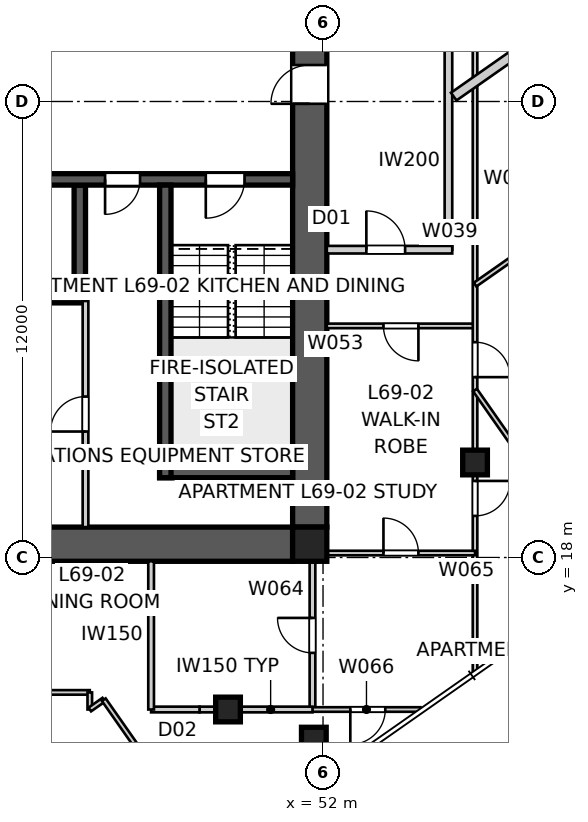
"""IFC4 building model, lengths in metres.
Left out: names, types, materials, properties, quantities, classifications, styles, units other than length and angle.
Written with IfcOpenShell. Run it as: python <this file> out.ifc"""

import sys

from ifc_helpers import new_model, si_unit, direction, frame, frame_2d, origin, origin_2d, place, context, subcontext, project, spatial, polyline, rectangle, outline, extrude, element, fill, save


model = new_model("IFC4")
c1 = context("Model", 3, precision=1e-05, world=origin(), true_north=direction((0.0, 1.0)))
c2 = subcontext(c1, "Body", "Model", "MODEL_VIEW")
j1 = project(units=[si_unit("LENGTHUNIT", "METRE"), si_unit("PLANEANGLEUNIT", "RADIAN")], contexts=[c1])
p1 = place(None, origin())
s1 = spatial("IfcSite", under=j1, at=p1, CompositionType="ELEMENT")
p2 = place(p1, origin())
s2 = spatial("IfcBuilding", under=s1, at=p2, CompositionType="ELEMENT")
p3 = place(p2, frame((0.0, 0.0, 250.6)))
s3 = spatial("IfcBuildingStorey", under=s2, at=p3, CompositionType="ELEMENT", Elevation=250.6)
p4 = place(p3, frame((51.2, 18.35, 0.0), z_axis=(0.0, 0.0, 1.0), x_axis=(-1.0, 0.0, 0.0)))
e1 = element("IfcWall", 1, at=p4, inside=s3, PredefinedType="SHEAR", context=c2, shape_type="SweptSolid", body=[
    extrude(outline(polyline([(0.0, -0.45), (22.4, -0.45), (22.4, -0.025), (22.85, -0.025), (22.85, 0.025), (22.4, 0.025), (22.4, 0.45), (0.0, 0.45), (0.0, 0.025), (-0.45, 0.025), (-0.45, -0.025), (0.0, -0.025), (0.0, -0.45)])), origin(), (0.0, 0.0, 1.0), 3.4),
])
p5 = place(p3, frame((51.65, 18.8, 0.0), z_axis=(0.0, 0.0, 1.0), x_axis=(0.0, 1.0, 0.0)))
e2 = element("IfcWall", 2, at=p5, inside=s3, PredefinedType="SHEAR", context=c2, shape_type="SweptSolid", body=[
    extrude(outline(polyline([(0.0, -0.45), (22.4, -0.45), (22.4, -0.025), (22.85, -0.025), (22.85, 0.025), (22.4, 0.025), (22.4, 0.45), (0.0, 0.45), (0.0, 0.025), (-0.45, 0.025), (-0.45, -0.025), (0.0, -0.025), (0.0, -0.45)])), origin(), (0.0, 0.0, 1.0), 3.4),
])
p6 = place(p5, frame((11.14, 0.0, 0.0)))
e3 = element("IfcOpeningElement", 3, at=p6, cuts=e2, PredefinedType="OPENING", context=c2, shape_type="SweptSolid", body=[
    extrude(rectangle(XDim=1.02, YDim=2.4, at=frame_2d((0.51, 1.2))), frame((0.0, 0.46, 0.0), z_axis=(0.0, -1.0, 0.0), x_axis=(1.0, 0.0, 0.0)), (0.0, 0.0, 1.0), 0.92),
])
p7 = place(p3, frame((51.2, 27.95, 0.0), z_axis=(0.0, 0.0, 1.0), x_axis=(-1.0, 0.0, 0.0)))
e4 = element("IfcWall", 4, at=p7, inside=s3, PredefinedType="SHEAR", context=c2, shape_type="SweptSolid", body=[
    extrude(rectangle(XDim=22.4, YDim=0.3, at=frame_2d((11.2, 0.0))), origin(), (0.0, 0.0, 1.0), 3.4),
])
p8 = place(p7, frame((19.04, 0.0, 0.0)))
e5 = element("IfcOpeningElement", 5, at=p8, cuts=e4, PredefinedType="OPENING", context=c2, shape_type="SweptSolid", body=[
    extrude(rectangle(XDim=0.92, YDim=2.1, at=frame_2d((0.46, 1.05))), frame((0.0, 0.16, 0.0), z_axis=(0.0, -1.0, 0.0), x_axis=(1.0, 0.0, 0.0)), (0.0, 0.0, 1.0), 0.32),
])
p9 = place(p7, frame((1.265, 0.0, 0.0)))
e6 = element("IfcOpeningElement", 6, at=p9, cuts=e4, PredefinedType="OPENING", context=c2, shape_type="SweptSolid", body=[
    extrude(rectangle(XDim=1.02, YDim=2.1, at=frame_2d((0.51, 1.05))), frame((0.0, 0.16, 0.0), z_axis=(0.0, -1.0, 0.0), x_axis=(1.0, 0.0, 0.0)), (0.0, 0.0, 1.0), 0.32),
])
p10 = place(p7, frame((4.015, 0.0, 0.0)))
e7 = element("IfcOpeningElement", 7, at=p10, cuts=e4, PredefinedType="OPENING", context=c2, shape_type="SweptSolid", body=[
    extrude(rectangle(XDim=0.92, YDim=2.1, at=frame_2d((0.46, 1.05))), frame((0.0, 0.16, 0.0), z_axis=(0.0, -1.0, 0.0), x_axis=(1.0, 0.0, 0.0)), (0.0, 0.0, 1.0), 0.32),
])
p11 = place(p7, frame((8.89, 0.0, 0.0)))
e8 = element("IfcOpeningElement", 8, at=p11, cuts=e4, PredefinedType="OPENING", context=c2, shape_type="SweptSolid", body=[
    extrude(rectangle(XDim=0.92, YDim=2.1, at=frame_2d((0.46, 1.05))), frame((0.0, 0.16, 0.0), z_axis=(0.0, -1.0, 0.0), x_axis=(1.0, 0.0, 0.0)), (0.0, 0.0, 1.0), 0.32),
])
p12 = place(p7, frame((6.565, 0.0, 0.0)))
e9 = element("IfcOpeningElement", 9, at=p12, cuts=e4, PredefinedType="OPENING", context=c2, shape_type="SweptSolid", body=[
    extrude(rectangle(XDim=0.92, YDim=2.1, at=frame_2d((0.46, 1.05))), frame((0.0, 0.16, 0.0), z_axis=(0.0, -1.0, 0.0), x_axis=(1.0, 0.0, 0.0)), (0.0, 0.0, 1.0), 0.32),
])
p13 = place(p7, frame((12.05, 0.0, 0.0)))
e10 = element("IfcOpeningElement", 10, at=p13, cuts=e4, PredefinedType="OPENING", context=c2, shape_type="SweptSolid", body=[
    extrude(rectangle(XDim=1.1, YDim=2.1, at=frame_2d((0.55, 1.05))), frame((0.0, 0.16, 0.0), z_axis=(0.0, -1.0, 0.0), x_axis=(1.0, 0.0, 0.0)), (0.0, 0.0, 1.0), 0.32),
])
p14 = place(p7, frame((14.85, 0.0, 0.0)))
e11 = element("IfcOpeningElement", 11, at=p14, cuts=e4, PredefinedType="OPENING", context=c2, shape_type="SweptSolid", body=[
    extrude(rectangle(XDim=1.1, YDim=2.1, at=frame_2d((0.55, 1.05))), frame((0.0, 0.16, 0.0), z_axis=(0.0, -1.0, 0.0), x_axis=(1.0, 0.0, 0.0)), (0.0, 0.0, 1.0), 0.32),
])
p15 = place(p3, frame((45.75, 24.85, 0.0), z_axis=(0.0, 0.0, 1.0), x_axis=(-1.0, 0.0, 0.0)))
e12 = element("IfcWall", 12, at=p15, inside=s3, PredefinedType="SHEAR", context=c2, shape_type="SweptSolid", body=[
    extrude(rectangle(XDim=11.5, YDim=0.3, at=frame_2d((5.75, 0.0))), origin(), (0.0, 0.0, 1.0), 3.4),
])
p16 = place(p3, frame((45.6, 27.8, 0.0), z_axis=(0.0, 0.0, 1.0), x_axis=(0.0, -1.0, 0.0)))
e13 = element("IfcWall", 13, at=p16, inside=s3, PredefinedType="SHEAR", context=c2, shape_type="SweptSolid", body=[
    extrude(rectangle(XDim=2.8, YDim=0.3, at=frame_2d((1.4, 0.0))), origin(), (0.0, 0.0, 1.0), 3.4),
])
p17 = place(p3, frame((47.85, 27.8, 0.0), z_axis=(0.0, 0.0, 1.0), x_axis=(0.0, -1.0, 0.0)))
e14 = element("IfcWall", 14, at=p17, inside=s3, PredefinedType="SHEAR", context=c2, shape_type="SweptSolid", body=[
    extrude(rectangle(XDim=7.7, YDim=0.3, at=frame_2d((3.85, 0.0))), origin(), (0.0, 0.0, 1.0), 3.4),
])
p18 = place(p3, frame((51.2, 20.25, 0.0), z_axis=(0.0, 0.0, 1.0), x_axis=(-1.0, 0.0, 0.0)))
e15 = element("IfcWall", 15, at=p18, inside=s3, PredefinedType="SHEAR", context=c2, shape_type="SweptSolid", body=[
    extrude(rectangle(XDim=3.5, YDim=0.3, at=frame_2d((1.75, 0.0))), origin(), (0.0, 0.0, 1.0), 3.4),
])
p19 = place(p3, frame((51.65, 18.35, 0.0), z_axis=(0.0, 0.0, 1.0), x_axis=(1.0, 0.0, 0.0)))
e16 = element("IfcColumn", 16, at=p19, inside=s3, PredefinedType="COLUMN", context=c2, shape_type="SweptSolid", body=[
    extrude(rectangle(XDim=0.9, YDim=0.9, at=origin_2d()), origin(), (0.0, 0.0, 1.0), 3.4),
])
for number, where, z_axis, x_axis in (
    (17, (51.758, 13.207, 0.0), (0.0, 0.0, 1.0), (1.0, 0.0, 0.0)),
    (18, (49.5, 14.0, 0.0), (0.0, 0.0, 1.0), (1.0, 0.0, 0.0)),
    (19, (56.0, 20.5, 0.0), (0.0, 0.0, 1.0), (1.0, 0.0, 0.0)),
):
    element("IfcColumn", number, at=place(p3, frame(where, z_axis=z_axis, x_axis=x_axis)), inside=s3, PredefinedType="COLUMN", context=c2, shape_type="SweptSolid", body=[
        extrude(rectangle(XDim=0.65, YDim=0.65, at=origin_2d()), origin(), (0.0, 0.0, 1.0), 3.4),
    ])
p20 = place(p3, frame((55.3, 26.1, 0.0), z_axis=(0.0, 0.0, 1.0), x_axis=(0.0, 1.0, 0.0)))
e20 = element("IfcWall", 20, at=p20, inside=s3, PredefinedType="PARTITIONING", context=c2, shape_type="SweptSolid", body=[
    extrude(rectangle(XDim=7.8, YDim=0.2, at=frame_2d((3.9, 0.0))), origin(), (0.0, 0.0, 1.0), 3.25),
])
p21 = place(p3, frame((52.1, 26.1, 0.0), z_axis=(0.0, 0.0, 1.0), x_axis=(1.0, 0.0, 0.0)))
e21 = element("IfcWall", 21, at=p21, inside=s3, PredefinedType="PARTITIONING", context=c2, shape_type="SweptSolid", body=[
    extrude(rectangle(XDim=3.3, YDim=0.2, at=frame_2d((1.65, 0.0))), origin(), (0.0, 0.0, 1.0), 3.25),
])
p22 = place(p21, frame((1.04, 0.0, 0.0)))
e22 = element("IfcOpeningElement", 22, at=p22, cuts=e21, PredefinedType="OPENING", context=c2, shape_type="SweptSolid", body=[
    extrude(rectangle(XDim=1.02, YDim=2.34, at=frame_2d((0.51, 1.17))), frame((0.0, 0.11, 0.0), z_axis=(0.0, -1.0, 0.0), x_axis=(1.0, 0.0, 0.0)), (0.0, 0.0, 1.0), 0.22),
])
p23 = place(p3, frame((62.631, 35.164, 0.0), z_axis=(0.0, 0.0, 1.0), x_axis=(-0.819152220062, -0.573576185321, 0.0)))
e23 = element("IfcWall", 23, at=p23, inside=s3, PredefinedType="PARTITIONING", context=c2, shape_type="SweptSolid", body=[
    extrude(rectangle(XDim=8.779, YDim=0.25, at=frame_2d((4.39, 0.0))), origin(), (0.0, 0.0, 1.0), 3.25),
])
p24 = place(p3, frame((45.75, 18.8, 0.0), z_axis=(0.0, 0.0, 1.0), x_axis=(0.0, 1.0, 0.0)))
e24 = element("IfcWall", 24, at=p24, inside=s3, PredefinedType="SOLIDWALL", context=c2, shape_type="SweptSolid", body=[
    extrude(rectangle(XDim=5.95, YDim=0.15, at=frame_2d((2.975, 0.0))), origin(), (0.0, 0.0, 1.0), 3.25),
])
p25 = place(p24, frame((2.515, 0.0, 0.0)))
e25 = element("IfcOpeningElement", 25, at=p25, cuts=e24, PredefinedType="OPENING", context=c2, shape_type="SweptSolid", body=[
    extrude(rectangle(XDim=0.92, YDim=2.1, at=frame_2d((0.46, 1.05))), frame((0.0, 0.085, 0.0), z_axis=(0.0, -1.0, 0.0), x_axis=(1.0, 0.0, 0.0)), (0.0, 0.0, 1.0), 0.17),
])
p26 = place(p3, frame((56.0, 24.095, 0.0), z_axis=(0.0, 0.0, 1.0), x_axis=(-1.0, 0.0, 0.0)))
e26 = element("IfcWall", 26, at=p26, inside=s3, PredefinedType="PARTITIONING", context=c2, shape_type="SweptSolid", body=[
    extrude(rectangle(XDim=3.9, YDim=0.12, at=frame_2d((1.95, 0.0))), origin(), (0.0, 0.0, 1.0), 2.796),
])
p27 = place(p26, frame((1.49, 0.0, 0.0)))
e27 = element("IfcOpeningElement", 27, at=p27, cuts=e26, PredefinedType="OPENING", context=c2, shape_type="SweptSolid", body=[
    extrude(rectangle(XDim=0.92, YDim=2.34, at=frame_2d((0.46, 1.17))), frame((0.0, 0.07, 0.0), z_axis=(0.0, -1.0, 0.0), x_axis=(1.0, 0.0, 0.0)), (0.0, 0.0, 1.0), 0.14),
])
p28 = place(p3, frame((56.0, 41.203, 0.0), z_axis=(0.0, 0.0, 1.0), x_axis=(0.0, -1.0, 0.0)))
e28 = element("IfcWall", 28, at=p28, inside=s3, PredefinedType="PARTITIONING", context=c2, shape_type="SweptSolid", body=[
    extrude(rectangle(XDim=26.198, YDim=0.12, at=frame_2d((13.099, 0.0))), origin(), (0.0, 0.0, 1.0), 2.55),
])
p29 = place(p28, frame((21.188, 0.0, 0.0)))
e29 = element("IfcOpeningElement", 29, at=p29, cuts=e28, PredefinedType="OPENING", context=c2, shape_type="SweptSolid", body=[
    extrude(rectangle(XDim=0.92, YDim=2.34, at=frame_2d((0.46, 1.17))), frame((0.0, 0.07, 0.0), z_axis=(0.0, -1.0, 0.0), x_axis=(1.0, 0.0, 0.0)), (0.0, 0.0, 1.0), 0.14),
])
p30 = place(p28, frame((17.537, 0.0, 0.0)))
e30 = element("IfcOpeningElement", 30, at=p30, cuts=e28, PredefinedType="OPENING", context=c2, shape_type="SweptSolid", body=[
    extrude(rectangle(XDim=0.92, YDim=2.34, at=frame_2d((0.46, 1.17))), frame((0.0, 0.07, 0.0), z_axis=(0.0, -1.0, 0.0), x_axis=(1.0, 0.0, 0.0)), (0.0, 0.0, 1.0), 0.14),
])
p31 = place(p28, frame((2.221, 0.0, 0.0)))
e31 = element("IfcOpeningElement", 31, at=p31, cuts=e28, PredefinedType="OPENING", context=c2, shape_type="SweptSolid", body=[
    extrude(rectangle(XDim=0.96, YDim=2.1, at=frame_2d((0.48, 1.05))), frame((0.0, 0.07, 0.0), z_axis=(0.0, -1.0, 0.0), x_axis=(1.0, 0.0, 0.0)), (0.0, 0.0, 1.0), 0.14),
])
p32 = place(p3, frame((51.722, 14.0, 0.0), z_axis=(0.0, 0.0, 1.0), x_axis=(0.0, 1.0, 0.0)))
e32 = element("IfcWall", 32, at=p32, inside=s3, PredefinedType="SOLIDWALL", context=c2, shape_type="SweptSolid", body=[
    extrude(rectangle(XDim=4.82, YDim=0.15, at=frame_2d((2.41, 0.0))), origin(), (0.0, 0.0, 1.0), 3.25),
])
p33 = place(p32, frame((1.49, 0.0, 0.0)))
e33 = element("IfcOpeningElement", 33, at=p33, cuts=e32, PredefinedType="OPENING", context=c2, shape_type="SweptSolid", body=[
    extrude(rectangle(XDim=0.92, YDim=2.1, at=frame_2d((0.46, 1.05))), frame((0.0, 0.085, 0.0), z_axis=(0.0, -1.0, 0.0), x_axis=(1.0, 0.0, 0.0)), (0.0, 0.0, 1.0), 0.17),
])
p34 = place(p3, frame((51.777, 18.118, 0.0), z_axis=(0.0, 0.0, 1.0), x_axis=(1.0, 0.0, 0.0)))
e34 = element("IfcWall", 34, at=p34, inside=s3, PredefinedType="PARTITIONING", context=c2, shape_type="SweptSolid", body=[
    extrude(rectangle(XDim=4.223, YDim=0.12, at=frame_2d((2.111, 0.0))), origin(), (0.0, 0.0, 1.0), 3.25),
])
p35 = place(p34, frame((1.812, 0.0, 0.0)))
e35 = element("IfcOpeningElement", 35, at=p35, cuts=e34, PredefinedType="OPENING", context=c2, shape_type="SweptSolid", body=[
    extrude(rectangle(XDim=0.92, YDim=2.1, at=frame_2d((0.46, 1.05))), frame((0.0, 0.07, 0.0), z_axis=(0.0, -1.0, 0.0), x_axis=(1.0, 0.0, 0.0)), (0.0, 0.0, 1.0), 0.14),
])
p36 = place(p3, frame((54.564, 14.0, 0.0), z_axis=(0.0, 0.0, 1.0), x_axis=(-1.0, 0.0, 0.0)))
e36 = element("IfcWall", 36, at=p36, inside=s3, PredefinedType="PARTITIONING", context=c2, shape_type="SweptSolid", body=[
    extrude(rectangle(XDim=2.842, YDim=0.12, at=frame_2d((1.421, 0.0))), origin(), (0.0, 0.0, 1.0), 3.25),
])
p37 = place(p36, frame((0.926, 0.0, 0.0)))
e37 = element("IfcOpeningElement", 37, at=p37, cuts=e36, PredefinedType="OPENING", context=c2, shape_type="SweptSolid", body=[
    extrude(rectangle(XDim=0.92, YDim=2.34, at=frame_2d((0.46, 1.17))), frame((0.0, 0.07, 0.0), z_axis=(0.0, -1.0, 0.0), x_axis=(1.0, 0.0, 0.0)), (0.0, 0.0, 1.0), 0.14),
])
p38 = place(p3, frame((51.722, 14.0, 0.0), z_axis=(0.0, 0.0, 1.0), x_axis=(-1.0, 0.0, 0.0)))
e38 = element("IfcWall", 38, at=p38, inside=s3, PredefinedType="SOLIDWALL", context=c2, shape_type="SweptSolid", body=[
    extrude(rectangle(XDim=2.202, YDim=0.15, at=frame_2d((1.101, 0.0))), origin(), (0.0, 0.0, 1.0), 3.25),
])
p39 = place(p3, frame((49.521, 14.0, 0.0), z_axis=(0.0, 0.0, 1.0), x_axis=(-1.0, 0.0, 0.0)))
e39 = element("IfcWall", 39, at=p39, inside=s3, PredefinedType="SOLIDWALL", context=c2, shape_type="SweptSolid", body=[
    extrude(rectangle(XDim=0.771, YDim=0.15, at=frame_2d((0.385, 0.0))), origin(), (0.0, 0.0, 1.0), 2.55),
])
p40 = place(p3, frame((48.75, 14.0, 0.0), z_axis=(0.0, 0.0, 1.0), x_axis=(-1.0, 0.0, 0.0)))
e40 = element("IfcWall", 40, at=p40, inside=s3, PredefinedType="SOLIDWALL", context=c2, shape_type="SweptSolid", body=[
    extrude(rectangle(XDim=1.274, YDim=0.15, at=frame_2d((0.637, 0.0))), origin(), (0.0, 0.0, 1.0), 3.25),
])
p41 = place(p3, frame((47.476, 14.0, 0.0), z_axis=(0.0, 0.0, 1.0), x_axis=(0.0, 1.0, 0.0)))
e41 = element("IfcWall", 41, at=p41, inside=s3, PredefinedType="SOLIDWALL", context=c2, shape_type="SweptSolid", body=[
    extrude(rectangle(XDim=3.9, YDim=0.15, at=frame_2d((1.95, 0.0))), origin(), (0.0, 0.0, 1.0), 3.25),
])
p42 = place(p3, frame((40.521, 14.0, 0.0), z_axis=(0.0, 0.0, 1.0), x_axis=(0.573574225095, -0.819153592623, 0.0)))
e42 = element("IfcWall", 42, at=p42, inside=s3, PredefinedType="PARTITIONING", context=c2, shape_type="SweptSolid", body=[
    extrude(rectangle(XDim=8.054, YDim=0.12, at=frame_2d((4.027, 0.0))), origin(), (0.0, 0.0, 1.0), 3.25),
])
p43 = place(p3, frame((56.0, 25.181, 0.0), z_axis=(0.0, 0.0, 1.0), x_axis=(0.819159093985, 0.573566368211, 0.0)))
e43 = element("IfcWall", 43, at=p43, inside=s3, PredefinedType="PARTITIONING", context=c2, shape_type="SweptSolid", body=[
    extrude(rectangle(XDim=4.253, YDim=0.12, at=frame_2d((2.126, 0.0))), origin(), (0.0, 0.0, 1.0), 3.25),
])
p44 = place(p43, frame((3.058, 0.0, 0.0)))
e44 = element("IfcOpeningElement", 44, at=p44, cuts=e43, PredefinedType="OPENING", context=c2, shape_type="SweptSolid", body=[
    extrude(rectangle(XDim=0.92, YDim=2.34, at=frame_2d((0.46, 1.17))), frame((0.0, 0.07, 0.0), z_axis=(0.0, -1.0, 0.0), x_axis=(1.0, 0.0, 0.0)), (0.0, 0.0, 1.0), 0.14),
])
p45 = place(p3, frame((59.477, 17.44, 0.0), z_axis=(0.0, 0.0, 1.0), x_axis=(-0.573573173989, 0.81915432861, 0.0)))
e45 = element("IfcWall", 45, at=p45, inside=s3, PredefinedType="PARTITIONING", context=c2, shape_type="SweptSolid", body=[
    extrude(rectangle(XDim=6.061, YDim=0.12, at=frame_2d((3.031, 0.0))), origin(), (0.0, 0.0, 1.0), 3.25),
])
p46 = place(p3, frame((41.634, 14.45, 0.0), z_axis=(0.0, 0.0, 1.0), x_axis=(1.0, 0.0, 0.0)))
e46 = element("IfcWall", 46, at=p46, inside=s3, PredefinedType="PARTITIONING", context=c2, shape_type="SweptSolid", body=[
    extrude(rectangle(XDim=4.229, YDim=0.12, at=frame_2d((2.114, 0.0))), origin(), (0.0, 0.0, 1.0), 3.25),
])
for number, where, z_axis, x_axis in (
    (47, (45.862, 14.45, 0.0), (0.0, 0.0, 1.0), (0.0, -1.0, 0.0)),
    (48, (45.862, 14.0, 0.0), (0.0, 0.0, 1.0), (0.819, 0.573, 0.0)),
):
    element("IfcWall", number, at=place(p3, frame(where, z_axis=z_axis, x_axis=x_axis)), inside=s3, PredefinedType="PARTITIONING", context=c2, shape_type="SweptSolid", body=[
        extrude(rectangle(XDim=0.45, YDim=0.12, at=frame_2d((0.225, 0.0))), origin(), (0.0, 0.0, 1.0), 3.25),
    ])
p47 = place(p3, frame((46.231, 14.258, 0.0), z_axis=(0.0, 0.0, 1.0), x_axis=(0.57358708951, -0.819144584763, 0.0)))
e49 = element("IfcWall", 49, at=p47, inside=s3, PredefinedType="PARTITIONING", context=c2, shape_type="SweptSolid", body=[
    extrude(rectangle(XDim=4.991, YDim=0.12, at=frame_2d((2.496, 0.0))), origin(), (0.0, 0.0, 1.0), 3.25),
])
p48 = place(p47, frame((2.055, 0.0, 0.0)))
e50 = element("IfcOpeningElement", 50, at=p48, cuts=e49, PredefinedType="OPENING", context=c2, shape_type="SweptSolid", body=[
    extrude(rectangle(XDim=0.92, YDim=2.34, at=frame_2d((0.46, 1.17))), frame((0.0, 0.07, 0.0), z_axis=(0.0, -1.0, 0.0), x_axis=(1.0, 0.0, 0.0)), (0.0, 0.0, 1.0), 0.14),
])
p49 = place(p3, frame((56.933, 31.175, 0.0), z_axis=(0.0, 0.0, 1.0), x_axis=(0.573563463091, -0.81916112811, 0.0)))
e51 = element("IfcWall", 51, at=p49, inside=s3, PredefinedType="SOLIDWALL", context=c2, shape_type="SweptSolid", body=[
    extrude(rectangle(XDim=4.375, YDim=0.15, at=frame_2d((2.188, 0.0))), origin(), (0.0, 0.0, 1.0), 3.25),
])
p50 = place(p9, origin())
e52 = element("IfcDoor", 52, at=p50, inside=s3, OperationType="SINGLE_SWING_RIGHT", PredefinedType="DOOR", context=c2, shape_type="SweptSolid", body=[
    extrude(rectangle(XDim=1.02, YDim=2.1, at=frame_2d((0.51, 1.05))), frame((0.0, 0.025, 0.0), z_axis=(0.0, -1.0, 0.0), x_axis=(1.0, 0.0, 0.0)), (0.0, 0.0, 1.0), 0.05),
])
fill(e6, e52)
p51 = place(p10, origin())
e53 = element("IfcDoor", 53, at=p51, inside=s3, OperationType="SINGLE_SWING_RIGHT", PredefinedType="DOOR", context=c2, shape_type="SweptSolid", body=[
    extrude(rectangle(XDim=0.92, YDim=2.1, at=frame_2d((0.46, 1.05))), frame((0.0, 0.025, 0.0), z_axis=(0.0, -1.0, 0.0), x_axis=(1.0, 0.0, 0.0)), (0.0, 0.0, 1.0), 0.05),
])
fill(e7, e53)
p52 = place(p22, origin())
e54 = element("IfcDoor", 54, at=p52, inside=s3, OperationType="SINGLE_SWING_LEFT", PredefinedType="DOOR", context=c2, shape_type="SweptSolid", body=[
    extrude(rectangle(XDim=1.02, YDim=2.34, at=frame_2d((0.51, 1.17))), frame((0.0, 0.025, 0.0), z_axis=(0.0, -1.0, 0.0), x_axis=(1.0, 0.0, 0.0)), (0.0, 0.0, 1.0), 0.05),
])
fill(e22, e54)
p53 = place(p25, origin())
e55 = element("IfcDoor", 55, at=p53, inside=s3, OperationType="SINGLE_SWING_LEFT", PredefinedType="DOOR", context=c2, shape_type="SweptSolid", body=[
    extrude(rectangle(XDim=0.92, YDim=2.1, at=frame_2d((0.46, 1.05))), frame((0.0, 0.025, 0.0), z_axis=(0.0, -1.0, 0.0), x_axis=(1.0, 0.0, 0.0)), (0.0, 0.0, 1.0), 0.05),
])
fill(e25, e55)
p54 = place(p27, origin())
e56 = element("IfcDoor", 56, at=p54, inside=s3, OperationType="SINGLE_SWING_LEFT", PredefinedType="DOOR", context=c2, shape_type="SweptSolid", body=[
    extrude(rectangle(XDim=0.92, YDim=2.34, at=frame_2d((0.46, 1.17))), frame((0.0, 0.025, 0.0), z_axis=(0.0, -1.0, 0.0), x_axis=(1.0, 0.0, 0.0)), (0.0, 0.0, 1.0), 0.05),
])
fill(e27, e56)
p55 = place(p29, origin())
e57 = element("IfcDoor", 57, at=p55, inside=s3, OperationType="SINGLE_SWING_LEFT", PredefinedType="DOOR", context=c2, shape_type="SweptSolid", body=[
    extrude(rectangle(XDim=0.92, YDim=2.34, at=frame_2d((0.46, 1.17))), frame((0.0, 0.025, 0.0), z_axis=(0.0, -1.0, 0.0), x_axis=(1.0, 0.0, 0.0)), (0.0, 0.0, 1.0), 0.05),
])
fill(e29, e57)
p56 = place(p35, origin())
e58 = element("IfcDoor", 58, at=p56, inside=s3, OperationType="SINGLE_SWING_LEFT", PredefinedType="DOOR", context=c2, shape_type="SweptSolid", body=[
    extrude(rectangle(XDim=0.92, YDim=2.1, at=frame_2d((0.46, 1.05))), frame((0.0, 0.025, 0.0), z_axis=(0.0, -1.0, 0.0), x_axis=(1.0, 0.0, 0.0)), (0.0, 0.0, 1.0), 0.05),
])
fill(e35, e58)
p57 = place(p30, origin())
e59 = element("IfcDoor", 59, at=p57, inside=s3, OperationType="SINGLE_SWING_RIGHT", PredefinedType="DOOR", context=c2, shape_type="SweptSolid", body=[
    extrude(rectangle(XDim=0.92, YDim=2.34, at=frame_2d((0.46, 1.17))), frame((0.0, 0.025, 0.0), z_axis=(0.0, -1.0, 0.0), x_axis=(1.0, 0.0, 0.0)), (0.0, 0.0, 1.0), 0.05),
])
fill(e30, e59)
p58 = place(p33, origin())
e60 = element("IfcDoor", 60, at=p58, inside=s3, OperationType="SINGLE_SWING_RIGHT", PredefinedType="DOOR", context=c2, shape_type="SweptSolid", body=[
    extrude(rectangle(XDim=0.92, YDim=2.1, at=frame_2d((0.46, 1.05))), frame((0.0, 0.025, 0.0), z_axis=(0.0, -1.0, 0.0), x_axis=(1.0, 0.0, 0.0)), (0.0, 0.0, 1.0), 0.05),
])
fill(e33, e60)
p59 = place(p37, origin())
e61 = element("IfcDoor", 61, at=p59, inside=s3, OperationType="SINGLE_SWING_RIGHT", PredefinedType="DOOR", context=c2, shape_type="SweptSolid", body=[
    extrude(rectangle(XDim=0.92, YDim=2.34, at=frame_2d((0.46, 1.17))), frame((0.0, 0.025, 0.0), z_axis=(0.0, -1.0, 0.0), x_axis=(1.0, 0.0, 0.0)), (0.0, 0.0, 1.0), 0.05),
])
fill(e37, e61)
p60 = place(p6, origin())
e62 = element("IfcDoor", 62, at=p60, inside=s3, OperationType="SINGLE_SWING_LEFT", PredefinedType="DOOR", context=c2, shape_type="SweptSolid", body=[
    extrude(rectangle(XDim=1.02, YDim=2.4, at=frame_2d((0.51, 1.2))), frame((0.0, 0.025, 0.0), z_axis=(0.0, -1.0, 0.0), x_axis=(1.0, 0.0, 0.0)), (0.0, 0.0, 1.0), 0.05),
])
fill(e3, e62)
save(model, sys.argv[1])
